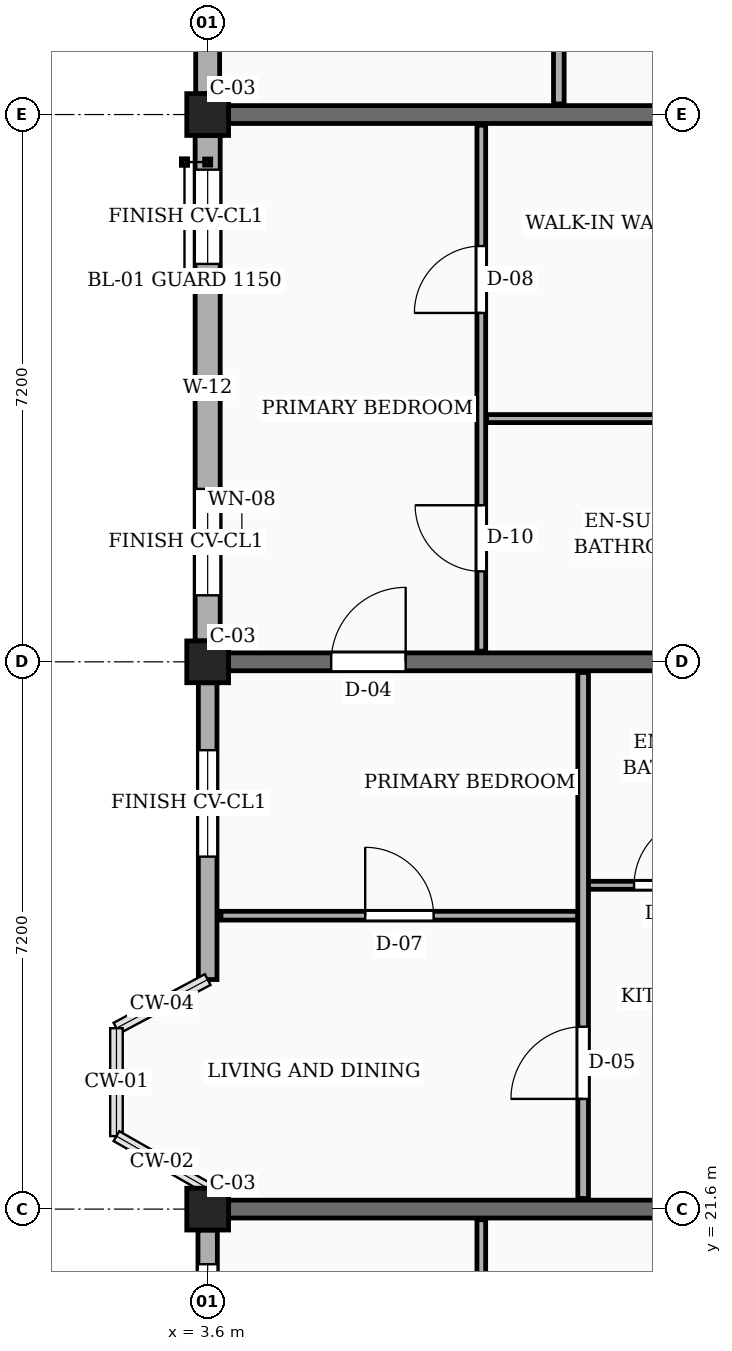
"""IFC4 building model, lengths in metres.
Left out: names, types, materials, properties, quantities, classifications, styles, units other than length and angle.
Written with IfcOpenShell. Run it as: python <this file> out.ifc"""

import sys

from ifc_helpers import new_model, si_unit, direction, frame, frame_2d, origin, origin_2d, place, context, subcontext, project, spatial, rectangle, extrude, element, fill, save


model = new_model("IFC4")
c1 = context("Model", 3, precision=1e-05, world=origin(), true_north=direction((0.0, 1.0)))
c2 = subcontext(c1, "Body", "Model", "MODEL_VIEW")
j1 = project(units=[si_unit("LENGTHUNIT", "METRE"), si_unit("PLANEANGLEUNIT", "RADIAN")], contexts=[c1])
p1 = place(None, origin())
s1 = spatial("IfcSite", under=j1, at=p1, CompositionType="ELEMENT")
p2 = place(p1, origin())
s2 = spatial("IfcBuilding", under=s1, at=p2, CompositionType="ELEMENT")
p3 = place(p2, frame((0.0, 0.0, 13.95)))
s3 = spatial("IfcBuildingStorey", under=s2, at=p3, CompositionType="ELEMENT", Elevation=13.95)
for number, where, z_axis, x_axis in (
    (1, (3.6, 21.6, 0.0), (0.0, 0.0, 1.0), (1.0, 0.0, 0.0)),
    (2, (3.6, 28.8, 0.0), (0.0, 0.0, 1.0), (1.0, 0.0, 0.0)),
    (3, (3.6, 36.0, 0.0), (0.0, 0.0, 1.0), (1.0, 0.0, 0.0)),
):
    element("IfcColumn", number, at=place(p3, frame(where, z_axis=z_axis, x_axis=x_axis)), inside=s3, PredefinedType="COLUMN", context=c2, shape_type="SweptSolid", body=[
        extrude(rectangle(XDim=0.55, YDim=0.55, at=origin_2d()), origin(), (0.0, 0.0, 1.0), 3.15),
    ])
p4 = place(p3, frame((3.875, 21.6, 0.0), z_axis=(0.0, 0.0, 1.0), x_axis=(1.0, 0.0, 0.0)))
e4 = element("IfcWall", 4, at=p4, inside=s3, PredefinedType="SOLIDWALL", context=c2, shape_type="SweptSolid", body=[
    extrude(rectangle(XDim=6.7, YDim=0.235, at=frame_2d((3.35, 0.0))), origin(), (0.0, 0.0, 1.0), 2.17),
])
p5 = place(p3, frame((3.875, 28.8, 0.0), z_axis=(0.0, 0.0, 1.0), x_axis=(1.0, 0.0, 0.0)))
e5 = element("IfcWall", 5, at=p5, inside=s3, PredefinedType="SOLIDWALL", context=c2, shape_type="SweptSolid", body=[
    extrude(rectangle(XDim=6.7, YDim=0.235, at=frame_2d((3.35, 0.0))), origin(), (0.0, 0.0, 1.0), 2.17),
])
p6 = place(p5, frame((1.35, 0.0, 0.0)))
e6 = element("IfcOpeningElement", 6, at=p6, cuts=e5, PredefinedType="OPENING", context=c2, shape_type="SweptSolid", body=[
    extrude(rectangle(XDim=0.98, YDim=2.12, at=frame_2d((0.49, 1.06))), frame((0.0, 0.127, 0.0), z_axis=(0.0, -1.0, 0.0), x_axis=(1.0, 0.0, 0.0)), (0.0, 0.0, 1.0), 0.255),
])
p7 = place(p3, frame((3.875, 36.0, 0.0), z_axis=(0.0, 0.0, 1.0), x_axis=(1.0, 0.0, 0.0)))
e7 = element("IfcWall", 7, at=p7, inside=s3, PredefinedType="SOLIDWALL", context=c2, shape_type="SweptSolid", body=[
    extrude(rectangle(XDim=6.7, YDim=0.235, at=frame_2d((3.35, 0.0))), origin(), (0.0, 0.0, 1.0), 2.17),
])
p8 = place(p3, frame((3.6, 42.925, 0.0), z_axis=(0.0, 0.0, 1.0), x_axis=(0.0, -1.0, 0.0)))
e8 = element("IfcWall", 8, at=p8, inside=s3, PredefinedType="SOLIDWALL", context=c2, shape_type="SweptSolid", body=[
    extrude(rectangle(XDim=6.65, YDim=0.315, at=frame_2d((3.325, 0.0))), origin(), (0.0, 0.0, 1.0), 2.44),
])
p9 = place(p8, frame((0.45, 0.0, 0.78)))
e9 = element("IfcOpeningElement", 9, at=p9, cuts=e8, PredefinedType="OPENING", context=c2, shape_type="SweptSolid", body=[
    extrude(rectangle(XDim=1.08, YDim=1.15, at=frame_2d((0.54, 0.575))), frame((0.0, 0.167, 0.0), z_axis=(0.0, -1.0, 0.0), x_axis=(1.0, 0.0, 0.0)), (0.0, 0.0, 1.0), 0.335),
])
p10 = place(p8, frame((4.65, 0.0, 0.78)))
e10 = element("IfcOpeningElement", 10, at=p10, cuts=e8, PredefinedType="OPENING", context=c2, shape_type="SweptSolid", body=[
    extrude(rectangle(XDim=1.24, YDim=1.15, at=frame_2d((0.62, 0.575))), frame((0.0, 0.167, 0.0), z_axis=(0.0, -1.0, 0.0), x_axis=(1.0, 0.0, 0.0)), (0.0, 0.0, 1.0), 0.335),
])
p11 = place(p3, frame((3.6, 35.725, 0.0), z_axis=(0.0, 0.0, 1.0), x_axis=(0.0, -1.0, 0.0)))
e11 = element("IfcWall", 11, at=p11, inside=s3, PredefinedType="SOLIDWALL", context=c2, shape_type="SweptSolid", body=[
    extrude(rectangle(XDim=6.65, YDim=0.33, at=frame_2d((3.325, 0.0))), origin(), (0.0, 0.0, 1.0), 2.44),
])
p12 = place(p11, frame((0.45, 0.0, 0.78)))
e12 = element("IfcOpeningElement", 12, at=p12, cuts=e11, PredefinedType="OPENING", context=c2, shape_type="SweptSolid", body=[
    extrude(rectangle(XDim=1.24, YDim=1.15, at=frame_2d((0.62, 0.575))), frame((0.0, 0.175, 0.0), z_axis=(0.0, -1.0, 0.0), x_axis=(1.0, 0.0, 0.0)), (0.0, 0.0, 1.0), 0.35),
])
p13 = place(p11, frame((4.65, 0.0, 0.78)))
e13 = element("IfcOpeningElement", 13, at=p13, cuts=e11, PredefinedType="OPENING", context=c2, shape_type="SweptSolid", body=[
    extrude(rectangle(XDim=1.4, YDim=1.15, at=frame_2d((0.7, 0.575))), frame((0.0, 0.175, 0.0), z_axis=(0.0, -1.0, 0.0), x_axis=(1.0, 0.0, 0.0)), (0.0, 0.0, 1.0), 0.35),
])
p14 = place(p3, frame((3.6, 28.525, 0.0), z_axis=(0.0, 0.0, 1.0), x_axis=(0.0, -1.0, 0.0)))
e14 = element("IfcWall", 14, at=p14, inside=s3, PredefinedType="SOLIDWALL", context=c2, shape_type="SweptSolid", body=[
    extrude(rectangle(XDim=3.905, YDim=0.245, at=frame_2d((1.952, 0.0))), origin(), (0.0, 0.0, 1.0), 2.44),
])
p15 = place(p14, frame((0.887, 0.0, 0.78)))
e15 = element("IfcOpeningElement", 15, at=p15, cuts=e14, PredefinedType="OPENING", context=c2, shape_type="SweptSolid", body=[
    extrude(rectangle(XDim=1.4, YDim=1.15, at=frame_2d((0.7, 0.575))), frame((0.0, 0.133, 0.0), z_axis=(0.0, -1.0, 0.0), x_axis=(1.0, 0.0, 0.0)), (0.0, 0.0, 1.0), 0.265),
])
p16 = place(p3, frame((3.6, 21.325, 0.0), z_axis=(0.0, 0.0, 1.0), x_axis=(0.0, -1.0, 0.0)))
e16 = element("IfcWall", 16, at=p16, inside=s3, PredefinedType="SOLIDWALL", context=c2, shape_type="SweptSolid", body=[
    extrude(rectangle(XDim=6.65, YDim=0.255, at=frame_2d((3.325, 0.0))), origin(), (0.0, 0.0, 1.0), 2.44),
])
p17 = place(p16, frame((0.45, 0.0, 0.78)))
e17 = element("IfcOpeningElement", 17, at=p17, cuts=e16, PredefinedType="OPENING", context=c2, shape_type="SweptSolid", body=[
    extrude(rectangle(XDim=0.88, YDim=1.26, at=frame_2d((0.44, 0.63))), frame((0.0, 0.137, 0.0), z_axis=(0.0, -1.0, 0.0), x_axis=(1.0, 0.0, 0.0)), (0.0, 0.0, 1.0), 0.275),
])
p18 = place(p16, frame((4.65, 0.0, 0.78)))
e18 = element("IfcOpeningElement", 18, at=p18, cuts=e16, PredefinedType="OPENING", context=c2, shape_type="SweptSolid", body=[
    extrude(rectangle(XDim=1.04, YDim=1.26, at=frame_2d((0.52, 0.63))), frame((0.0, 0.137, 0.0), z_axis=(0.0, -1.0, 0.0), x_axis=(1.0, 0.0, 0.0)), (0.0, 0.0, 1.0), 0.275),
])
p19 = place(p3, frame((7.2, 14.54, 0.0), z_axis=(0.0, 0.0, 1.0), x_axis=(0.0, 1.0, 0.0)))
e19 = element("IfcWall", 19, at=p19, inside=s3, PredefinedType="PARTITIONING", context=c2, shape_type="SweptSolid", body=[
    extrude(rectangle(XDim=6.92, YDim=0.115, at=frame_2d((3.46, 0.0))), origin(), (0.0, 0.0, 1.0), 2.305),
])
p20 = place(p19, frame((1.05, 0.0, 0.0)))
e20 = element("IfcOpeningElement", 20, at=p20, cuts=e19, PredefinedType="OPENING", context=c2, shape_type="SweptSolid", body=[
    extrude(rectangle(XDim=0.87, YDim=2.05, at=frame_2d((0.435, 1.025))), frame((0.0, 0.067, 0.0), z_axis=(0.0, -1.0, 0.0), x_axis=(1.0, 0.0, 0.0)), (0.0, 0.0, 1.0), 0.135),
])
p21 = place(p19, frame((4.45, 0.0, 0.0)))
e21 = element("IfcOpeningElement", 21, at=p21, cuts=e19, PredefinedType="OPENING", context=c2, shape_type="SweptSolid", body=[
    extrude(rectangle(XDim=0.88, YDim=2.08, at=frame_2d((0.44, 1.04))), frame((0.0, 0.067, 0.0), z_axis=(0.0, -1.0, 0.0), x_axis=(1.0, 0.0, 0.0)), (0.0, 0.0, 1.0), 0.135),
])
p22 = place(p3, frame((3.775, 25.46, 0.0), z_axis=(0.0, 0.0, 1.0), x_axis=(1.0, 0.0, 0.0)))
e22 = element("IfcWall", 22, at=p22, inside=s3, PredefinedType="PARTITIONING", context=c2, shape_type="SweptSolid", body=[
    extrude(rectangle(XDim=4.695, YDim=0.115, at=frame_2d((2.348, 0.0))), origin(), (0.0, 0.0, 1.0), 2.305),
])
p23 = place(p22, frame((1.897, 0.0, 0.0)))
e23 = element("IfcOpeningElement", 23, at=p23, cuts=e22, PredefinedType="OPENING", context=c2, shape_type="SweptSolid", body=[
    extrude(rectangle(XDim=0.9, YDim=2.1, at=frame_2d((0.45, 1.05))), frame((0.0, 0.067, 0.0), z_axis=(0.0, -1.0, 0.0), x_axis=(1.0, 0.0, 0.0)), (0.0, 0.0, 1.0), 0.135),
])
p24 = place(p3, frame((8.61, 25.86, 0.0), z_axis=(0.0, 0.0, 1.0), x_axis=(1.0, 0.0, 0.0)))
e24 = element("IfcWall", 24, at=p24, inside=s3, PredefinedType="PARTITIONING", context=c2, shape_type="SweptSolid", body=[
    extrude(rectangle(XDim=2.1, YDim=0.105, at=frame_2d((1.05, 0.0))), origin(), (0.0, 0.0, 1.0), 2.305),
])
p25 = place(p24, frame((0.6, 0.0, 0.0)))
e25 = element("IfcOpeningElement", 25, at=p25, cuts=e24, PredefinedType="OPENING", context=c2, shape_type="SweptSolid", body=[
    extrude(rectangle(XDim=0.9, YDim=2.05, at=frame_2d((0.45, 1.025))), frame((0.0, 0.062, 0.0), z_axis=(0.0, -1.0, 0.0), x_axis=(1.0, 0.0, 0.0)), (0.0, 0.0, 1.0), 0.125),
])
p26 = place(p3, frame((8.54, 21.74, 0.0), z_axis=(0.0, 0.0, 1.0), x_axis=(0.0, 1.0, 0.0)))
e26 = element("IfcWall", 26, at=p26, inside=s3, PredefinedType="PARTITIONING", context=c2, shape_type="SweptSolid", body=[
    extrude(rectangle(XDim=6.92, YDim=0.14, at=frame_2d((3.46, 0.0))), origin(), (0.0, 0.0, 1.0), 2.305),
])
p27 = place(p26, frame((1.31, 0.0, 0.0)))
e27 = element("IfcOpeningElement", 27, at=p27, cuts=e26, PredefinedType="OPENING", context=c2, shape_type="SweptSolid", body=[
    extrude(rectangle(XDim=0.95, YDim=2.1, at=frame_2d((0.475, 1.05))), frame((0.0, 0.08, 0.0), z_axis=(0.0, -1.0, 0.0), x_axis=(1.0, 0.0, 0.0)), (0.0, 0.0, 1.0), 0.16),
])
p28 = place(p3, frame((7.2, 28.94, 0.0), z_axis=(0.0, 0.0, 1.0), x_axis=(0.0, 1.0, 0.0)))
e28 = element("IfcWall", 28, at=p28, inside=s3, PredefinedType="PARTITIONING", context=c2, shape_type="SweptSolid", body=[
    extrude(rectangle(XDim=6.92, YDim=0.115, at=frame_2d((3.46, 0.0))), origin(), (0.0, 0.0, 1.0), 2.305),
])
p29 = place(p28, frame((1.05, 0.0, 0.0)))
e29 = element("IfcOpeningElement", 29, at=p29, cuts=e28, PredefinedType="OPENING", context=c2, shape_type="SweptSolid", body=[
    extrude(rectangle(XDim=0.87, YDim=2.05, at=frame_2d((0.435, 1.025))), frame((0.0, 0.067, 0.0), z_axis=(0.0, -1.0, 0.0), x_axis=(1.0, 0.0, 0.0)), (0.0, 0.0, 1.0), 0.135),
])
p30 = place(p28, frame((4.45, 0.0, 0.0)))
e30 = element("IfcOpeningElement", 30, at=p30, cuts=e28, PredefinedType="OPENING", context=c2, shape_type="SweptSolid", body=[
    extrude(rectangle(XDim=0.88, YDim=2.08, at=frame_2d((0.44, 1.04))), frame((0.0, 0.067, 0.0), z_axis=(0.0, -1.0, 0.0), x_axis=(1.0, 0.0, 0.0)), (0.0, 0.0, 1.0), 0.135),
])
p31 = place(p3, frame((7.27, 32.0, 0.0), z_axis=(0.0, 0.0, 1.0), x_axis=(1.0, 0.0, 0.0)))
e31 = element("IfcWall", 31, at=p31, inside=s3, PredefinedType="PARTITIONING", context=c2, shape_type="SweptSolid", body=[
    extrude(rectangle(XDim=3.39, YDim=0.105, at=frame_2d((1.695, 0.0))), origin(), (0.0, 0.0, 1.0), 2.305),
])
p32 = place(p3, frame((8.22, 36.14, 0.0), z_axis=(0.0, 0.0, 1.0), x_axis=(0.0, 1.0, 0.0)))
e32 = element("IfcWall", 32, at=p32, inside=s3, PredefinedType="PARTITIONING", context=c2, shape_type="SweptSolid", body=[
    extrude(rectangle(XDim=6.92, YDim=0.14, at=frame_2d((3.46, 0.0))), origin(), (0.0, 0.0, 1.0), 2.305),
])
p33 = place(p32, frame((1.31, 0.0, 0.0)))
e33 = element("IfcOpeningElement", 33, at=p33, cuts=e32, PredefinedType="OPENING", context=c2, shape_type="SweptSolid", body=[
    extrude(rectangle(XDim=0.95, YDim=2.1, at=frame_2d((0.475, 1.05))), frame((0.0, 0.08, 0.0), z_axis=(0.0, -1.0, 0.0), x_axis=(1.0, 0.0, 0.0)), (0.0, 0.0, 1.0), 0.16),
])
p34 = place(p12, origin())
e34 = element("IfcWindow", 34, at=p34, inside=s3, PartitioningType="SINGLE_PANEL", PredefinedType="WINDOW", context=c2, shape_type="SweptSolid", body=[
    extrude(rectangle(XDim=1.24, YDim=1.15, at=frame_2d((0.62, 0.575))), frame((0.0, 0.03, 0.0), z_axis=(0.0, -1.0, 0.0), x_axis=(1.0, 0.0, 0.0)), (0.0, 0.0, 1.0), 0.06),
])
fill(e12, e34)
p35 = place(p13, origin())
e35 = element("IfcWindow", 35, at=p35, inside=s3, PartitioningType="SINGLE_PANEL", PredefinedType="WINDOW", context=c2, shape_type="SweptSolid", body=[
    extrude(rectangle(XDim=1.4, YDim=1.15, at=frame_2d((0.7, 0.575))), frame((0.0, 0.03, 0.0), z_axis=(0.0, -1.0, 0.0), x_axis=(1.0, 0.0, 0.0)), (0.0, 0.0, 1.0), 0.06),
])
fill(e13, e35)
p36 = place(p15, origin())
e36 = element("IfcWindow", 36, at=p36, inside=s3, PartitioningType="SINGLE_PANEL", PredefinedType="WINDOW", context=c2, shape_type="SweptSolid", body=[
    extrude(rectangle(XDim=1.4, YDim=1.15, at=frame_2d((0.7, 0.575))), frame((0.0, 0.03, 0.0), z_axis=(0.0, -1.0, 0.0), x_axis=(1.0, 0.0, 0.0)), (0.0, 0.0, 1.0), 0.06),
])
fill(e15, e36)
p37 = place(p17, origin())
e37 = element("IfcWindow", 37, at=p37, inside=s3, PartitioningType="SINGLE_PANEL", PredefinedType="WINDOW", context=c2, shape_type="SweptSolid", body=[
    extrude(rectangle(XDim=0.88, YDim=1.26, at=frame_2d((0.44, 0.63))), frame((0.0, 0.03, 0.0), z_axis=(0.0, -1.0, 0.0), x_axis=(1.0, 0.0, 0.0)), (0.0, 0.0, 1.0), 0.06),
])
fill(e17, e37)
p38 = place(p23, origin())
e38 = element("IfcDoor", 38, at=p38, inside=s3, OperationType="SINGLE_SWING_LEFT", PredefinedType="DOOR", context=c2, shape_type="SweptSolid", body=[
    extrude(rectangle(XDim=0.9, YDim=2.1, at=frame_2d((0.45, 1.05))), frame((0.0, 0.025, 0.0), z_axis=(0.0, -1.0, 0.0), x_axis=(1.0, 0.0, 0.0)), (0.0, 0.0, 1.0), 0.05),
])
fill(e23, e38)
p39 = place(p25, origin())
e39 = element("IfcDoor", 39, at=p39, inside=s3, OperationType="SINGLE_SWING_RIGHT", PredefinedType="DOOR", context=c2, shape_type="SweptSolid", body=[
    extrude(rectangle(XDim=0.9, YDim=2.05, at=frame_2d((0.45, 1.025))), frame((0.0, 0.025, 0.0), z_axis=(0.0, -1.0, 0.0), x_axis=(1.0, 0.0, 0.0)), (0.0, 0.0, 1.0), 0.05),
])
fill(e25, e39)
p40 = place(p27, origin())
e40 = element("IfcDoor", 40, at=p40, inside=s3, OperationType="SINGLE_SWING_LEFT", PredefinedType="DOOR", context=c2, shape_type="SweptSolid", body=[
    extrude(rectangle(XDim=0.95, YDim=2.1, at=frame_2d((0.475, 1.05))), frame((0.0, 0.025, 0.0), z_axis=(0.0, -1.0, 0.0), x_axis=(1.0, 0.0, 0.0)), (0.0, 0.0, 1.0), 0.05),
])
fill(e27, e40)
p41 = place(p29, origin())
e41 = element("IfcDoor", 41, at=p41, inside=s3, OperationType="SINGLE_SWING_RIGHT", PredefinedType="DOOR", context=c2, shape_type="SweptSolid", body=[
    extrude(rectangle(XDim=0.87, YDim=2.05, at=frame_2d((0.435, 1.025))), frame((0.0, 0.025, 0.0), z_axis=(0.0, -1.0, 0.0), x_axis=(1.0, 0.0, 0.0)), (0.0, 0.0, 1.0), 0.05),
])
fill(e29, e41)
p42 = place(p30, origin())
e42 = element("IfcDoor", 42, at=p42, inside=s3, OperationType="SINGLE_SWING_LEFT", PredefinedType="DOOR", context=c2, shape_type="SweptSolid", body=[
    extrude(rectangle(XDim=0.88, YDim=2.08, at=frame_2d((0.44, 1.04))), frame((0.0, 0.025, 0.0), z_axis=(0.0, -1.0, 0.0), x_axis=(1.0, 0.0, 0.0)), (0.0, 0.0, 1.0), 0.05),
])
fill(e30, e42)
p43 = place(p6, origin())
e43 = element("IfcDoor", 43, at=p43, inside=s3, OperationType="SINGLE_SWING_RIGHT", PredefinedType="DOOR", context=c2, shape_type="SweptSolid", body=[
    extrude(rectangle(XDim=0.98, YDim=2.12, at=frame_2d((0.49, 1.06))), frame((0.0, 0.025, 0.0), z_axis=(0.0, -1.0, 0.0), x_axis=(1.0, 0.0, 0.0)), (0.0, 0.0, 1.0), 0.05),
])
fill(e6, e43)
save(model, sys.argv[1])
